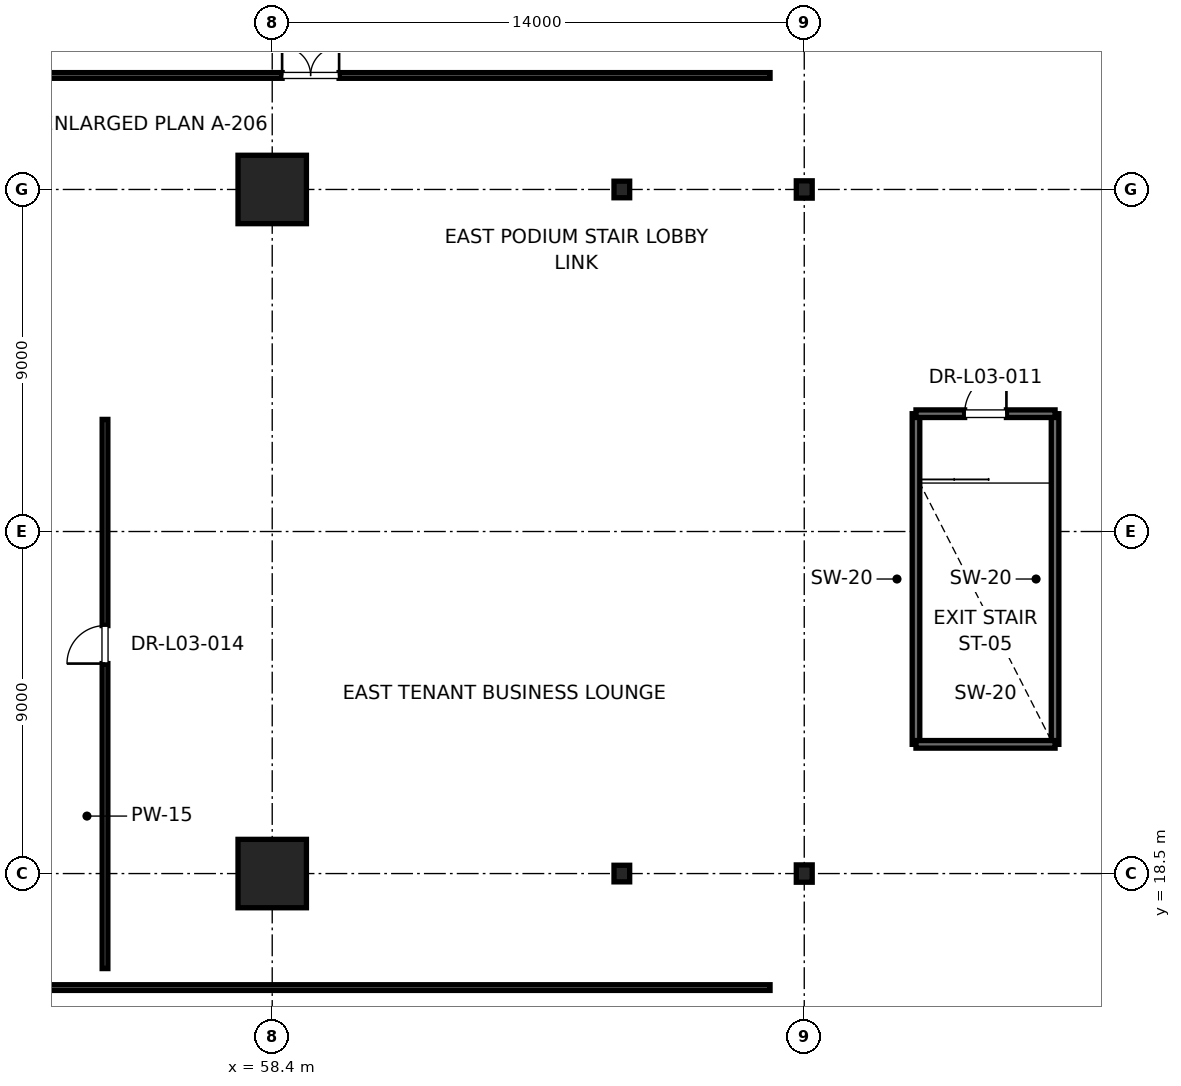
"""IFC4 building model, lengths in metres.
Left out: names, types, materials, properties, quantities, classifications, styles, units other than length and angle.
Written with IfcOpenShell. Run it as: python <this file> out.ifc"""

import sys

from ifc_helpers import new_model, si_unit, direction, frame, frame_2d, origin, origin_2d, place, context, subcontext, project, spatial, rectangle, i_section, extrude, element, fill, save


model = new_model("IFC4")
c1 = context("Model", 3, precision=1e-05, world=origin(), true_north=direction((0.0, 1.0)))
c2 = subcontext(c1, "Body", "Model", "MODEL_VIEW")
j1 = project(units=[si_unit("LENGTHUNIT", "METRE"), si_unit("PLANEANGLEUNIT", "RADIAN")], contexts=[c1])
p1 = place(None, origin())
s1 = spatial("IfcSite", under=j1, at=p1, CompositionType="ELEMENT")
p2 = place(p1, origin())
s2 = spatial("IfcBuilding", under=s1, at=p2, CompositionType="ELEMENT")
p3 = place(p2, frame((0.0, 0.0, 16.4)))
s3 = spatial("IfcBuildingStorey", under=s2, at=p3, CompositionType="ELEMENT", Elevation=16.4)
for number, where, z_axis, x_axis in (
    (1, (58.4, 18.5, 0.0), (0.0, 0.0, 1.0), (1.0, 0.0, 0.0)),
    (2, (58.4, 36.5, 0.0), (0.0, 0.0, 1.0), (1.0, 0.0, 0.0)),
):
    element("IfcColumn", number, at=place(p3, frame(where, z_axis=z_axis, x_axis=x_axis)), inside=s3, PredefinedType="COLUMN", context=c2, shape_type="SweptSolid", body=[
        extrude(rectangle(XDim=1.8, YDim=1.8, at=origin_2d()), origin(), (0.0, 0.0, 1.0), 5.2),
    ])
for number, where, z_axis, x_axis in (
    (3, (67.6, 18.5, 0.0), (0.0, 0.0, 1.0), (1.0, 0.0, 0.0)),
    (4, (67.6, 36.5, 0.0), (0.0, 0.0, 1.0), (1.0, 0.0, 0.0)),
):
    element("IfcColumn", number, at=place(p3, frame(where, z_axis=z_axis, x_axis=x_axis)), inside=s3, PredefinedType="COLUMN", context=c2, shape_type="SweptSolid", body=[
        extrude(i_section(OverallWidth=0.412, OverallDepth=0.437, WebThickness=0.036, FlangeThickness=0.058, FilletRadius=0.015, at=origin_2d()), origin(), (0.0, 0.0, 1.0), 5.2),
    ])
for number, where, z_axis, x_axis in (
    (5, (72.4, 18.5, 0.0), (0.0, 0.0, 1.0), (1.0, 0.0, 0.0)),
    (6, (72.4, 36.5, 0.0), (0.0, 0.0, 1.0), (1.0, 0.0, 0.0)),
):
    element("IfcColumn", number, at=place(p3, frame(where, z_axis=z_axis, x_axis=x_axis)), inside=s3, PredefinedType="COLUMN", context=c2, shape_type="SweptSolid", body=[
        extrude(i_section(OverallWidth=0.418, OverallDepth=0.456, WebThickness=0.042, FlangeThickness=0.067, FilletRadius=0.015, at=origin_2d()), origin(), (0.0, 0.0, 1.0), 5.2),
    ])
for number, where, z_axis, x_axis in (
    (7, (75.34, 21.9, 0.0), (0.0, 0.0, 1.0), (0.0, 1.0, 0.0)),
    (8, (79.0, 21.9, 0.0), (0.0, 0.0, 1.0), (0.0, 1.0, 0.0)),
):
    element("IfcWall", number, at=place(p3, frame(where, z_axis=z_axis, x_axis=x_axis)), inside=s3, PredefinedType="SOLIDWALL", context=c2, shape_type="SweptSolid", body=[
        extrude(rectangle(XDim=8.7, YDim=0.2, at=frame_2d((4.35, 0.0))), origin(), (0.0, 0.0, 1.0), 4.9),
    ])
p4 = place(p3, frame((75.34, 30.6, 0.0), z_axis=(0.0, 0.0, 1.0), x_axis=(1.0, 0.0, 0.0)))
e9 = element("IfcWall", 9, at=p4, inside=s3, PredefinedType="SOLIDWALL", context=c2, shape_type="SweptSolid", body=[
    extrude(rectangle(XDim=3.66, YDim=0.2, at=frame_2d((1.83, 0.0))), origin(), (0.0, 0.0, 1.0), 4.9),
])
p5 = place(p4, frame((1.28, 0.0, 0.0)))
e10 = element("IfcOpeningElement", 10, at=p5, cuts=e9, PredefinedType="OPENING", context=c2, shape_type="SweptSolid", body=[
    extrude(rectangle(XDim=1.1, YDim=2.15, at=frame_2d((0.55, 1.075))), frame((0.0, 0.1, 0.0), z_axis=(0.0, -1.0, 0.0), x_axis=(1.0, 0.0, 0.0)), (0.0, 0.0, 1.0), 0.2),
])
p6 = place(p3, frame((75.34, 21.9, 0.0), z_axis=(0.0, 0.0, 1.0), x_axis=(1.0, 0.0, 0.0)))
e11 = element("IfcWall", 11, at=p6, inside=s3, PredefinedType="SOLIDWALL", context=c2, shape_type="SweptSolid", body=[
    extrude(rectangle(XDim=3.66, YDim=0.2, at=frame_2d((1.83, 0.0))), origin(), (0.0, 0.0, 1.0), 4.9),
])
p7 = place(p3, frame((9.5, 15.5, 0.0), z_axis=(0.0, 0.0, 1.0), x_axis=(1.0, 0.0, 0.0)))
e12 = element("IfcWall", 12, at=p7, inside=s3, PredefinedType="PARTITIONING", context=c2, shape_type="SweptSolid", body=[
    extrude(rectangle(XDim=62.0, YDim=0.15, at=frame_2d((31.0, 0.0))), origin(), (0.0, 0.0, 1.0), 2.85),
])
p8 = place(p7, frame((30.5, 0.0, 0.0)))
e13 = element("IfcOpeningElement", 13, at=p8, cuts=e12, PredefinedType="OPENING", context=c2, shape_type="SweptSolid", body=[
    extrude(rectangle(XDim=1.0, YDim=2.15, at=frame_2d((0.5, 1.075))), frame((0.0, 0.075, 0.0), z_axis=(0.0, -1.0, 0.0), x_axis=(1.0, 0.0, 0.0)), (0.0, 0.0, 1.0), 0.15),
])
p9 = place(p3, frame((47.32, 39.5, 0.0), z_axis=(0.0, 0.0, 1.0), x_axis=(1.0, 0.0, 0.0)))
e14 = element("IfcWall", 14, at=p9, inside=s3, PredefinedType="PARTITIONING", context=c2, shape_type="SweptSolid", body=[
    extrude(rectangle(XDim=24.18, YDim=0.15, at=frame_2d((12.09, 0.0))), origin(), (0.0, 0.0, 1.0), 2.85),
])
p10 = place(p9, frame((11.34, 0.0, 0.0)))
e15 = element("IfcOpeningElement", 15, at=p10, cuts=e14, PredefinedType="OPENING", context=c2, shape_type="SweptSolid", body=[
    extrude(rectangle(XDim=1.5, YDim=2.25, at=frame_2d((0.75, 1.125))), frame((0.0, 0.075, 0.0), z_axis=(0.0, -1.0, 0.0), x_axis=(1.0, 0.0, 0.0)), (0.0, 0.0, 1.0), 0.15),
])
p11 = place(p3, frame((54.0, 16.0, 0.0), z_axis=(0.0, 0.0, 1.0), x_axis=(0.0, 1.0, 0.0)))
e16 = element("IfcWall", 16, at=p11, inside=s3, PredefinedType="PARTITIONING", context=c2, shape_type="SweptSolid", body=[
    extrude(rectangle(XDim=14.45, YDim=0.15, at=frame_2d((7.225, 0.0))), origin(), (0.0, 0.0, 1.0), 2.85),
])
p12 = place(p11, frame((8.025, 0.0, 0.0)))
e17 = element("IfcOpeningElement", 17, at=p12, cuts=e16, PredefinedType="OPENING", context=c2, shape_type="SweptSolid", body=[
    extrude(rectangle(XDim=1.0, YDim=2.15, at=frame_2d((0.5, 1.075))), frame((0.0, 0.075, 0.0), z_axis=(0.0, -1.0, 0.0), x_axis=(1.0, 0.0, 0.0)), (0.0, 0.0, 1.0), 0.15),
])
p13 = place(p5, origin())
e18 = element("IfcDoor", 18, at=p13, inside=s3, OperationType="SINGLE_SWING_RIGHT", PredefinedType="DOOR", context=c2, shape_type="SweptSolid", body=[
    extrude(rectangle(XDim=1.1, YDim=2.15, at=frame_2d((0.55, 1.075))), frame((0.0, 0.025, 0.0), z_axis=(0.0, -1.0, 0.0), x_axis=(1.0, 0.0, 0.0)), (0.0, 0.0, 1.0), 0.05),
])
fill(e10, e18)
p14 = place(p10, origin())
e19 = element("IfcDoor", 19, at=p14, inside=s3, OperationType="DOUBLE_DOOR_SINGLE_SWING", PredefinedType="DOOR", context=c2, shape_type="SweptSolid", body=[
    extrude(rectangle(XDim=1.5, YDim=2.25, at=frame_2d((0.75, 1.125))), frame((0.0, 0.025, 0.0), z_axis=(0.0, -1.0, 0.0), x_axis=(1.0, 0.0, 0.0)), (0.0, 0.0, 1.0), 0.05),
])
fill(e15, e19)
p15 = place(p12, origin())
e20 = element("IfcDoor", 20, at=p15, inside=s3, OperationType="SINGLE_SWING_LEFT", PredefinedType="DOOR", context=c2, shape_type="SweptSolid", body=[
    extrude(rectangle(XDim=1.0, YDim=2.15, at=frame_2d((0.5, 1.075))), frame((0.0, 0.025, 0.0), z_axis=(0.0, -1.0, 0.0), x_axis=(1.0, 0.0, 0.0)), (0.0, 0.0, 1.0), 0.05),
])
fill(e17, e20)
save(model, sys.argv[1])
